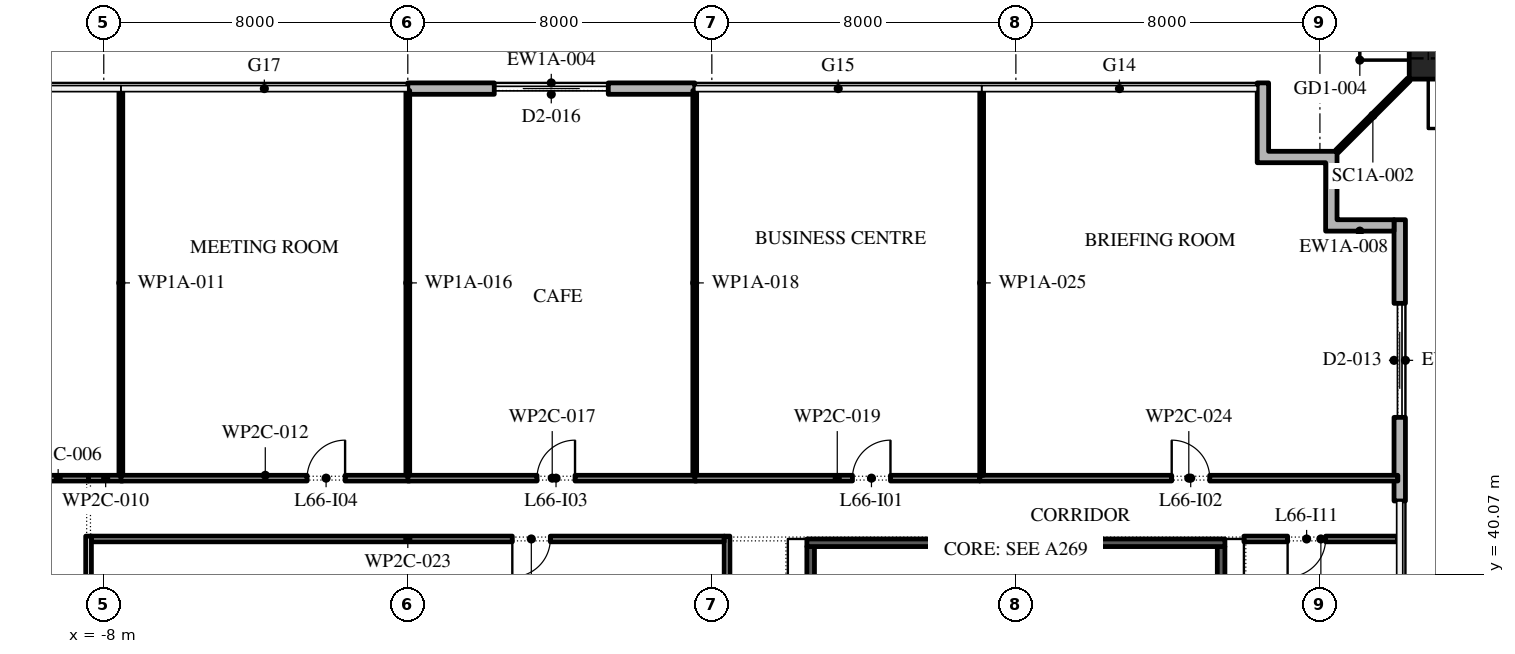
"""IFC4 building model, lengths in metres.
Left out: names, types, materials, properties, quantities, classifications, styles, units other than length and angle.
Written with IfcOpenShell. Run it as: python <this file> out.ifc"""

import sys

from ifc_helpers import new_model, si_unit, direction, frame, frame_2d, origin, origin_2d, place, context, subcontext, project, spatial, polyline, rectangle, outline, extrude, element, fill, save


model = new_model("IFC4")
c1 = context("Model", 3, precision=1e-05, world=origin(), true_north=direction((0.0, 1.0)))
c2 = subcontext(c1, "Body", "Model", "MODEL_VIEW")
j1 = project(units=[si_unit("LENGTHUNIT", "METRE"), si_unit("PLANEANGLEUNIT", "RADIAN")], contexts=[c1])
p1 = place(None, origin())
s1 = spatial("IfcSite", under=j1, at=p1, CompositionType="ELEMENT")
p2 = place(p1, origin())
s2 = spatial("IfcBuilding", under=s1, at=p2, CompositionType="ELEMENT")
p3 = place(p2, frame((0.0, 0.0, 303.0)))
s3 = spatial("IfcBuildingStorey", under=s2, at=p3, CompositionType="ELEMENT", Elevation=303.0)
p4 = place(p3, frame((26.85, 53.6, 0.0), z_axis=(0.0, 0.090528438609, 0.995893870753), x_axis=(-1.0, 0.0, 0.0)))
e1 = element("IfcColumn", 1, at=p4, inside=s3, PredefinedType="COLUMN", context=c2, shape_type="SweptSolid", body=[
    extrude(rectangle(XDim=1.0, YDim=1.0, at=origin_2d()), origin(), (0.0, 0.0, 1.0), 6.025),
])
p5 = place(p3, frame((26.1, 42.0, 0.0), z_axis=(0.0, 0.0, 1.0), x_axis=(0.0, 1.0, 0.0)))
e2 = element("IfcWall", 2, at=p5, inside=s3, PredefinedType="STANDARD", context=c2, shape_type="SweptSolid", body=[
    extrude(rectangle(XDim=7.4, YDim=0.3, at=frame_2d((3.7, 0.0))), origin(), (0.0, 0.0, 1.0), 5.8),
])
p6 = place(p5, frame((2.2, 0.0, 0.0)))
e3 = element("IfcOpeningElement", 3, at=p6, cuts=e2, PredefinedType="OPENING", context=c2, shape_type="SweptSolid", body=[
    extrude(rectangle(XDim=3.0, YDim=3.5, at=frame_2d((1.5, 1.75))), frame((0.0, 0.16, 0.0), z_axis=(0.0, -1.0, 0.0), x_axis=(1.0, 0.0, 0.0)), (0.0, 0.0, 1.0), 0.32),
])
p7 = place(p3, frame((7.55, 52.85, 0.0), z_axis=(0.0, 0.0, 1.0), x_axis=(-1.0, 0.0, 0.0)))
e4 = element("IfcWall", 4, at=p7, inside=s3, PredefinedType="STANDARD", context=c2, shape_type="SweptSolid", body=[
    extrude(rectangle(XDim=7.55, YDim=0.3, at=frame_2d((3.775, 0.0))), origin(), (0.0, 0.0, 1.0), 5.8),
])
p8 = place(p7, frame((2.275, 0.0, 0.0)))
e5 = element("IfcOpeningElement", 5, at=p8, cuts=e4, PredefinedType="OPENING", context=c2, shape_type="SweptSolid", body=[
    extrude(rectangle(XDim=3.0, YDim=3.5, at=frame_2d((1.5, 1.75))), frame((0.0, 0.16, 0.0), z_axis=(0.0, -1.0, 0.0), x_axis=(1.0, 0.0, 0.0)), (0.0, 0.0, 1.0), 0.32),
])
p9 = place(p3, origin())
e6 = element("IfcWall", 6, at=p9, inside=s3, PredefinedType="STANDARD", context=c2, shape_type="SweptSolid", body=[
    extrude(outline(polyline([(24.15, 50.9), (22.35, 50.9), (22.35, 53.0), (22.65, 53.0), (22.65, 51.2), (24.45, 51.2), (24.45, 49.4), (25.95, 49.4), (25.95, 49.1), (24.15, 49.1), (24.15, 50.9)])), origin(), (0.0, 0.0, 1.0), 5.8),
])
p10 = place(p3, frame((24.45, 51.2, 0.0), z_axis=(0.0, 0.0, 1.0), x_axis=(0.707106781187, 0.707106781187, 0.0)))
e7 = element("IfcWall", 7, at=p10, inside=s3, PredefinedType="STANDARD", context=c2, shape_type="SweptSolid", body=[
    extrude(rectangle(XDim=2.667, YDim=0.1, at=frame_2d((1.333, 0.0))), origin(), (0.0, 0.0, 1.0), 5.8),
])
p11 = place(p3, frame((21.4, 25.75, 0.0), z_axis=(0.0, 0.0, 1.0), x_axis=(0.0, 1.0, 0.0)))
e8 = element("IfcWall", 8, at=p11, inside=s3, PredefinedType="SHEAR", context=c2, shape_type="SweptSolid", body=[
    extrude(rectangle(XDim=15.05, YDim=0.2, at=frame_2d((7.525, 0.0))), origin(), (0.0, 0.0, 1.0), 5.8),
])
p12 = place(p3, frame((10.6, 25.75, 0.0), z_axis=(0.0, 0.0, 1.0), x_axis=(0.0, 1.0, 0.0)))
e9 = element("IfcWall", 9, at=p12, inside=s3, PredefinedType="SHEAR", context=c2, shape_type="SweptSolid", body=[
    extrude(rectangle(XDim=15.05, YDim=0.2, at=frame_2d((7.525, 0.0))), origin(), (0.0, 0.0, 1.0), 5.8),
])
p13 = place(p12, frame((3.288, 0.0, 0.0)))
e10 = element("IfcOpeningElement", 10, at=p13, cuts=e9, PredefinedType="OPENING", context=c2, shape_type="SweptSolid", body=[
    extrude(rectangle(XDim=0.9, YDim=2.1, at=frame_2d((0.45, 1.05))), frame((0.0, 0.11, 0.0), z_axis=(0.0, -1.0, 0.0), x_axis=(1.0, 0.0, 0.0)), (0.0, 0.0, 1.0), 0.22),
])
p14 = place(p12, frame((10.887, 0.0, 0.0)))
e11 = element("IfcOpeningElement", 11, at=p14, cuts=e9, PredefinedType="OPENING", context=c2, shape_type="SweptSolid", body=[
    extrude(rectangle(XDim=0.9, YDim=2.1, at=frame_2d((0.45, 1.05))), frame((0.0, 0.11, 0.0), z_axis=(0.0, -1.0, 0.0), x_axis=(1.0, 0.0, 0.0)), (0.0, 0.0, 1.0), 0.22),
])
p15 = place(p3, frame((10.5, 40.9, 0.0), z_axis=(0.0, 0.0, 1.0), x_axis=(1.0, 0.0, 0.0)))
e12 = element("IfcWall", 12, at=p15, inside=s3, PredefinedType="SHEAR", context=c2, shape_type="SweptSolid", body=[
    extrude(rectangle(XDim=11.0, YDim=0.2, at=frame_2d((5.5, 0.0))), origin(), (0.0, 0.0, 1.0), 5.8),
])
p16 = place(p3, frame((-10.0, 42.6, 0.0), z_axis=(0.0, 0.0, 1.0), x_axis=(1.0, 0.0, 0.0)))
e13 = element("IfcWall", 13, at=p16, inside=s3, PredefinedType="PARTITIONING", context=c2, shape_type="SweptSolid", body=[
    extrude(rectangle(XDim=1.6, YDim=0.15, at=frame_2d((0.8, 0.0))), origin(), (0.0, 0.0, 1.0), 5.8),
])
p17 = place(p3, frame((-8.4, 41.075, 0.0), z_axis=(0.0, 0.0, 1.0), x_axis=(0.0, -1.0, 0.0)))
e14 = element("IfcWall", 14, at=p17, inside=s3, PredefinedType="PARTITIONING", context=c2, shape_type="SweptSolid", body=[
    extrude(rectangle(XDim=9.025, YDim=0.15, at=frame_2d((4.512, 0.0))), origin(), (0.0, 0.0, 1.0), 5.8),
])
p18 = place(p3, frame((-8.4, 42.6, 0.0), z_axis=(0.0, 0.0, 1.0), x_axis=(1.0, 0.0, 0.0)))
e15 = element("IfcWall", 15, at=p18, inside=s3, PredefinedType="PARTITIONING", context=c2, shape_type="SweptSolid", body=[
    extrude(rectangle(XDim=0.9, YDim=0.15, at=frame_2d((0.45, 0.0))), origin(), (0.0, 0.0, 1.0), 5.8),
])
p19 = place(p3, frame((-7.55, 42.675, 0.0), z_axis=(0.0, 0.0, 1.0), x_axis=(0.0, 1.0, 0.0)))
e16 = element("IfcWall", 16, at=p19, inside=s3, PredefinedType="PARTITIONING", context=c2, shape_type="SweptSolid", body=[
    extrude(rectangle(XDim=10.125, YDim=0.1, at=frame_2d((5.062, 0.0))), origin(), (0.0, 0.0, 1.0), 5.8),
])
p20 = place(p3, frame((-7.55, 42.6, 0.0), z_axis=(0.0, 0.0, 1.0), x_axis=(1.0, 0.0, 0.0)))
e17 = element("IfcWall", 17, at=p20, inside=s3, PredefinedType="PARTITIONING", context=c2, shape_type="SweptSolid", body=[
    extrude(rectangle(XDim=7.6, YDim=0.15, at=frame_2d((3.8, 0.0))), origin(), (0.0, 0.0, 1.0), 5.8),
])
p21 = place(p20, frame((4.9, 0.0, 0.0)))
e18 = element("IfcOpeningElement", 18, at=p21, cuts=e17, PredefinedType="OPENING", context=c2, shape_type="SweptSolid", body=[
    extrude(rectangle(XDim=1.0, YDim=2.1, at=frame_2d((0.5, 1.05))), frame((0.0, 0.085, 0.0), z_axis=(0.0, -1.0, 0.0), x_axis=(1.0, 0.0, 0.0)), (0.0, 0.0, 1.0), 0.17),
])
p22 = place(p3, frame((0.0, 42.675, 0.0), z_axis=(0.0, 0.0, 1.0), x_axis=(0.0, 1.0, 0.0)))
e19 = element("IfcWall", 19, at=p22, inside=s3, PredefinedType="PARTITIONING", context=c2, shape_type="SweptSolid", body=[
    extrude(rectangle(XDim=10.125, YDim=0.1, at=frame_2d((5.062, 0.0))), origin(), (0.0, 0.0, 1.0), 5.8),
])
p23 = place(p3, frame((0.0, 42.6, 0.0), z_axis=(0.0, 0.0, 1.0), x_axis=(1.0, 0.0, 0.0)))
e20 = element("IfcWall", 20, at=p23, inside=s3, PredefinedType="PARTITIONING", context=c2, shape_type="SweptSolid", body=[
    extrude(rectangle(XDim=7.6, YDim=0.15, at=frame_2d((3.8, 0.0))), origin(), (0.0, 0.0, 1.0), 5.8),
])
p24 = place(p23, frame((3.4, 0.0, 0.0)))
e21 = element("IfcOpeningElement", 21, at=p24, cuts=e20, PredefinedType="OPENING", context=c2, shape_type="SweptSolid", body=[
    extrude(rectangle(XDim=1.0, YDim=2.1, at=frame_2d((0.5, 1.05))), frame((0.0, 0.085, 0.0), z_axis=(0.0, -1.0, 0.0), x_axis=(1.0, 0.0, 0.0)), (0.0, 0.0, 1.0), 0.17),
])
p25 = place(p3, frame((7.55, 42.675, 0.0), z_axis=(0.0, 0.0, 1.0), x_axis=(0.0, 1.0, 0.0)))
e22 = element("IfcWall", 22, at=p25, inside=s3, PredefinedType="PARTITIONING", context=c2, shape_type="SweptSolid", body=[
    extrude(rectangle(XDim=10.125, YDim=0.1, at=frame_2d((5.062, 0.0))), origin(), (0.0, 0.0, 1.0), 5.8),
])
p26 = place(p3, frame((7.55, 42.6, 0.0), z_axis=(0.0, 0.0, 1.0), x_axis=(1.0, 0.0, 0.0)))
e23 = element("IfcWall", 23, at=p26, inside=s3, PredefinedType="PARTITIONING", context=c2, shape_type="SweptSolid", body=[
    extrude(rectangle(XDim=7.5, YDim=0.15, at=frame_2d((3.75, 0.0))), origin(), (0.0, 0.0, 1.0), 5.8),
])
p27 = place(p26, frame((4.15, 0.0, 0.0)))
e24 = element("IfcOpeningElement", 24, at=p27, cuts=e23, PredefinedType="OPENING", context=c2, shape_type="SweptSolid", body=[
    extrude(rectangle(XDim=1.0, YDim=2.1, at=frame_2d((0.5, 1.05))), frame((0.0, 0.085, 0.0), z_axis=(0.0, -1.0, 0.0), x_axis=(1.0, 0.0, 0.0)), (0.0, 0.0, 1.0), 0.17),
])
p28 = place(p3, frame((8.4, 32.0, 0.0), z_axis=(0.0, 0.0, 1.0), x_axis=(0.0, 1.0, 0.0)))
e25 = element("IfcWall", 25, at=p28, inside=s3, PredefinedType="PARTITIONING", context=c2, shape_type="SweptSolid", body=[
    extrude(rectangle(XDim=9.075, YDim=0.15, at=frame_2d((4.538, 0.0))), origin(), (0.0, 0.0, 1.0), 5.8),
])
p29 = place(p3, frame((8.325, 41.0, 0.0), z_axis=(0.0, 0.0, 1.0), x_axis=(-1.0, 0.0, 0.0)))
e26 = element("IfcWall", 26, at=p29, inside=s3, PredefinedType="PARTITIONING", context=c2, shape_type="SweptSolid", body=[
    extrude(rectangle(XDim=16.65, YDim=0.15, at=frame_2d((8.325, 0.0))), origin(), (0.0, 0.0, 1.0), 5.8),
])
p30 = place(p29, frame((4.575, 0.0, 0.0)))
e27 = element("IfcOpeningElement", 27, at=p30, cuts=e26, PredefinedType="OPENING", context=c2, shape_type="SweptSolid", body=[
    extrude(rectangle(XDim=1.0, YDim=2.1, at=frame_2d((0.5, 1.05))), frame((0.0, 0.085, 0.0), z_axis=(0.0, -1.0, 0.0), x_axis=(1.0, 0.0, 0.0)), (0.0, 0.0, 1.0), 0.17),
])
p31 = place(p3, frame((15.05, 42.6, 0.0), z_axis=(0.0, 0.0, 1.0), x_axis=(1.0, 0.0, 0.0)))
e28 = element("IfcWall", 28, at=p31, inside=s3, PredefinedType="PARTITIONING", context=c2, shape_type="SweptSolid", body=[
    extrude(rectangle(XDim=11.0, YDim=0.15, at=frame_2d((5.5, 0.0))), origin(), (0.0, 0.0, 1.0), 5.8),
])
p32 = place(p31, frame((5.05, 0.0, 0.0)))
e29 = element("IfcOpeningElement", 29, at=p32, cuts=e28, PredefinedType="OPENING", context=c2, shape_type="SweptSolid", body=[
    extrude(rectangle(XDim=1.0, YDim=2.1, at=frame_2d((0.5, 1.05))), frame((0.0, 0.085, 0.0), z_axis=(0.0, -1.0, 0.0), x_axis=(1.0, 0.0, 0.0)), (0.0, 0.0, 1.0), 0.17),
])
p33 = place(p3, frame((15.1, 52.8, 0.0), z_axis=(0.0, 0.0, 1.0), x_axis=(0.0, -1.0, 0.0)))
e30 = element("IfcWall", 30, at=p33, inside=s3, PredefinedType="PARTITIONING", context=c2, shape_type="SweptSolid", body=[
    extrude(rectangle(XDim=10.125, YDim=0.1, at=frame_2d((5.062, 0.0))), origin(), (0.0, 0.0, 1.0), 5.8),
])
p34 = place(p3, frame((26.05, 41.0, 0.0), z_axis=(0.0, 0.0, 1.0), x_axis=(-1.0, 0.0, 0.0)))
e31 = element("IfcWall", 31, at=p34, inside=s3, PredefinedType="PARTITIONING", context=c2, shape_type="SweptSolid", body=[
    extrude(rectangle(XDim=4.05, YDim=0.15, at=frame_2d((2.025, 0.0))), origin(), (0.0, 0.0, 1.0), 5.8),
])
p35 = place(p34, frame((1.9, 0.0, 0.0)))
e32 = element("IfcOpeningElement", 32, at=p35, cuts=e31, PredefinedType="OPENING", context=c2, shape_type="SweptSolid", body=[
    extrude(rectangle(XDim=1.0, YDim=2.1, at=frame_2d((0.5, 1.05))), frame((0.0, 0.085, 0.0), z_axis=(0.0, -1.0, 0.0), x_axis=(1.0, 0.0, 0.0)), (0.0, 0.0, 1.0), 0.17),
])
p36 = place(p6, origin())
e33 = element("IfcDoor", 33, at=p36, inside=s3, OperationType="DOUBLE_DOOR_SLIDING", PredefinedType="DOOR", context=c2, shape_type="SweptSolid", body=[
    extrude(rectangle(XDim=3.0, YDim=3.5, at=frame_2d((1.5, 1.75))), frame((0.0, 0.025, 0.0), z_axis=(0.0, -1.0, 0.0), x_axis=(1.0, 0.0, 0.0)), (0.0, 0.0, 1.0), 0.05),
])
fill(e3, e33)
p37 = place(p8, origin())
e34 = element("IfcDoor", 34, at=p37, inside=s3, OperationType="DOUBLE_DOOR_SLIDING", PredefinedType="DOOR", context=c2, shape_type="SweptSolid", body=[
    extrude(rectangle(XDim=3.0, YDim=3.5, at=frame_2d((1.5, 1.75))), frame((0.0, 0.025, 0.0), z_axis=(0.0, -1.0, 0.0), x_axis=(1.0, 0.0, 0.0)), (0.0, 0.0, 1.0), 0.05),
])
fill(e5, e34)
p38 = place(p27, origin())
e35 = element("IfcDoor", 35, at=p38, inside=s3, OperationType="SINGLE_SWING_LEFT", PredefinedType="DOOR", context=c2, shape_type="SweptSolid", body=[
    extrude(rectangle(XDim=1.0, YDim=2.1, at=frame_2d((0.5, 1.05))), frame((0.0, 0.025, 0.0), z_axis=(0.0, -1.0, 0.0), x_axis=(1.0, 0.0, 0.0)), (0.0, 0.0, 1.0), 0.05),
])
fill(e24, e35)
p39 = place(p32, origin())
e36 = element("IfcDoor", 36, at=p39, inside=s3, OperationType="SINGLE_SWING_RIGHT", PredefinedType="DOOR", context=c2, shape_type="SweptSolid", body=[
    extrude(rectangle(XDim=1.0, YDim=2.1, at=frame_2d((0.5, 1.05))), frame((0.0, 0.025, 0.0), z_axis=(0.0, -1.0, 0.0), x_axis=(1.0, 0.0, 0.0)), (0.0, 0.0, 1.0), 0.05),
])
fill(e29, e36)
p40 = place(p24, origin())
e37 = element("IfcDoor", 37, at=p40, inside=s3, OperationType="SINGLE_SWING_LEFT", PredefinedType="DOOR", context=c2, shape_type="SweptSolid", body=[
    extrude(rectangle(XDim=1.0, YDim=2.1, at=frame_2d((0.5, 1.05))), frame((0.0, 0.025, 0.0), z_axis=(0.0, -1.0, 0.0), x_axis=(1.0, 0.0, 0.0)), (0.0, 0.0, 1.0), 0.05),
])
fill(e21, e37)
p41 = place(p21, origin())
e38 = element("IfcDoor", 38, at=p41, inside=s3, OperationType="SINGLE_SWING_LEFT", PredefinedType="DOOR", context=c2, shape_type="SweptSolid", body=[
    extrude(rectangle(XDim=1.0, YDim=2.1, at=frame_2d((0.5, 1.05))), frame((0.0, 0.025, 0.0), z_axis=(0.0, -1.0, 0.0), x_axis=(1.0, 0.0, 0.0)), (0.0, 0.0, 1.0), 0.05),
])
fill(e18, e38)
p42 = place(p30, origin())
e39 = element("IfcDoor", 39, at=p42, inside=s3, OperationType="SINGLE_SWING_LEFT", PredefinedType="DOOR", context=c2, shape_type="SweptSolid", body=[
    extrude(rectangle(XDim=1.0, YDim=2.1, at=frame_2d((0.5, 1.05))), frame((0.0, 0.025, 0.0), z_axis=(0.0, -1.0, 0.0), x_axis=(1.0, 0.0, 0.0)), (0.0, 0.0, 1.0), 0.05),
])
fill(e27, e39)
p43 = place(p35, origin())
e40 = element("IfcDoor", 40, at=p43, inside=s3, OperationType="SINGLE_SWING_LEFT", PredefinedType="DOOR", context=c2, shape_type="SweptSolid", body=[
    extrude(rectangle(XDim=1.0, YDim=2.1, at=frame_2d((0.5, 1.05))), frame((0.0, 0.025, 0.0), z_axis=(0.0, -1.0, 0.0), x_axis=(1.0, 0.0, 0.0)), (0.0, 0.0, 1.0), 0.05),
])
fill(e32, e40)
save(model, sys.argv[1])
